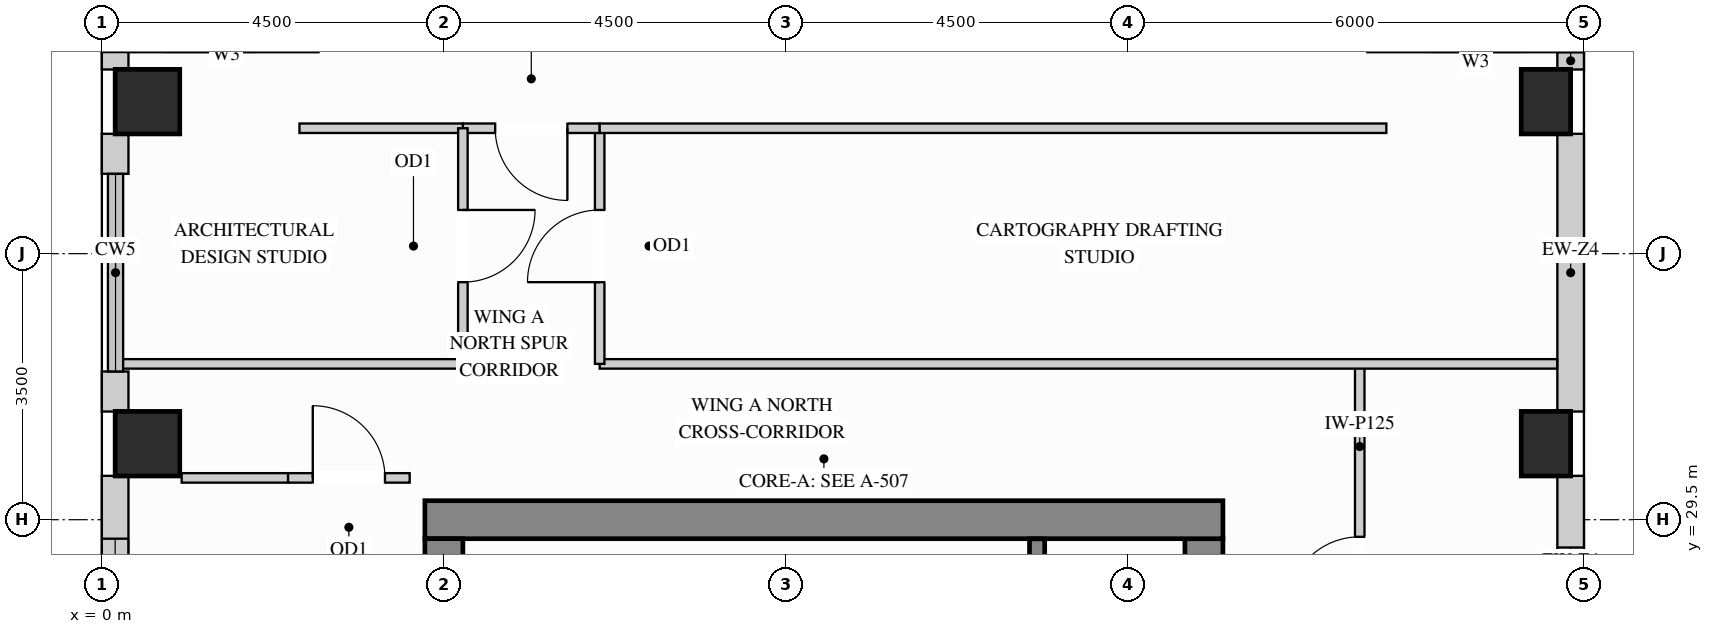
"""IFC4 building model, lengths in metres.
Left out: names, types, materials, properties, quantities, classifications, styles, units other than length and angle.
Written with IfcOpenShell. Run it as: python <this file> out.ifc"""

import sys

from ifc_helpers import new_model, si_unit, direction, frame, frame_2d, origin, origin_2d, place, context, subcontext, project, spatial, rectangle, extrude, source, transform, mapped, element, fill, save


model = new_model("IFC4")
c1 = context("Model", 3, precision=1e-05, world=origin(), true_north=direction((0.0, 1.0)))
c2 = subcontext(c1, "Body", "Model", "MODEL_VIEW")
j1 = project(units=[si_unit("LENGTHUNIT", "METRE"), si_unit("PLANEANGLEUNIT", "RADIAN")], contexts=[c1])
p1 = place(None, origin())
s1 = spatial("IfcSite", under=j1, at=p1, CompositionType="ELEMENT")
p2 = place(p1, origin())
s2 = spatial("IfcBuilding", under=s1, at=p2, CompositionType="ELEMENT")
p3 = place(p2, frame((0.0, 0.0, 241.2)))
s3 = spatial("IfcBuildingStorey", under=s2, at=p3, CompositionType="ELEMENT", Elevation=241.2)
m1 = source(origin(), c2, "Body", "SweptSolid", [
    extrude(rectangle(XDim=0.65, YDim=0.85, at=origin_2d()), origin(), (0.0, 0.0, 1.0), 3.4),
])
for number, where, z_axis, x_axis in (
    (1, (19.0, 30.5, 0.0), (0.0, 0.0, 1.0), (1.0, 0.0, 0.0)),
    (2, (19.0, 35.0, 0.0), (0.0, 0.0, 1.0), (1.0, 0.0, 0.0)),
):
    element("IfcColumn", number, at=place(p3, frame(where, z_axis=z_axis, x_axis=x_axis)), inside=s3, PredefinedType="COLUMN", context=c2, shape_type="MappedRepresentation", body=[
        mapped(m1, transform((0.0, 0.0, 0.0), x_axis=(1.0, 0.0, 0.0), y_axis=(0.0, 1.0, 0.0), z_axis=(0.0, 0.0, 1.0))),
    ])
m2 = source(origin(), c2, "Body", "SweptSolid", [
    extrude(rectangle(XDim=0.85, YDim=0.85, at=origin_2d()), origin(), (0.0, 0.0, 1.0), 3.4),
])
for number, where, z_axis, x_axis in (
    (3, (0.6, 30.5, 0.0), (0.0, 0.0, 1.0), (1.0, 0.0, 0.0)),
    (4, (0.6, 35.0, 0.0), (0.0, 0.0, 1.0), (1.0, 0.0, 0.0)),
):
    element("IfcColumn", number, at=place(p3, frame(where, z_axis=z_axis, x_axis=x_axis)), inside=s3, PredefinedType="COLUMN", context=c2, shape_type="MappedRepresentation", body=[
        mapped(m2, transform((0.0, 0.0, 0.0), x_axis=(1.0, 0.0, 0.0), y_axis=(0.0, 1.0, 0.0), z_axis=(0.0, 0.0, 1.0))),
    ])
m3 = source(origin(), c2, "Body", "SweptSolid", [
    extrude(rectangle(XDim=8.37, YDim=0.5, at=frame_2d((4.185, 0.0))), origin(), (0.0, 0.0, 1.0), 3.4),
])
p4 = place(p3, frame((14.5, 20.88, 0.0), z_axis=(0.0, 0.0, 1.0), x_axis=(0.0, 1.0, 0.0)))
e5 = element("IfcWall", 5, at=p4, inside=s3, PredefinedType="SHEAR", context=c2, shape_type="MappedRepresentation", body=[
    mapped(m3, transform((0.0, 0.0, 0.0), x_axis=(1.0, 0.0, 0.0), y_axis=(0.0, 1.0, 0.0), z_axis=(0.0, 0.0, 1.0))),
])
m4 = source(origin(), c2, "Body", "SweptSolid", [
    extrude(rectangle(XDim=10.5, YDim=0.5, at=frame_2d((5.25, 0.0))), origin(), (0.0, 0.0, 1.0), 3.4),
])
p5 = place(p3, frame((4.25, 29.5, 0.0), z_axis=(0.0, 0.0, 1.0), x_axis=(1.0, 0.0, 0.0)))
e6 = element("IfcWall", 6, at=p5, inside=s3, PredefinedType="SHEAR", context=c2, shape_type="MappedRepresentation", body=[
    mapped(m4, transform((0.0, 0.0, 0.0), x_axis=(1.0, 0.0, 0.0), y_axis=(0.0, 1.0, 0.0), z_axis=(0.0, 0.0, 1.0))),
])
m5 = source(origin(), c2, "Body", "SweptSolid", [
    extrude(rectangle(XDim=20.5, YDim=0.5, at=frame_2d((10.25, 0.0))), origin(), (0.0, 0.0, 1.0), 3.4),
])
p6 = place(p3, frame((4.5, 8.75, 0.0), z_axis=(0.0, 0.0, 1.0), x_axis=(0.0, 1.0, 0.0)))
e7 = element("IfcWall", 7, at=p6, inside=s3, PredefinedType="SHEAR", context=c2, shape_type="MappedRepresentation", body=[
    mapped(m5, transform((0.0, 0.0, 0.0), x_axis=(1.0, 0.0, 0.0), y_axis=(0.0, 1.0, 0.0), z_axis=(0.0, 0.0, 1.0))),
])
p7 = place(p3, frame((19.325, 27.223, 0.0), z_axis=(0.0, 0.0, 1.0), x_axis=(0.0, 1.0, 0.0)))
e8 = element("IfcWall", 8, at=p7, inside=s3, PredefinedType="SOLIDWALL", context=c2, shape_type="SweptSolid", body=[
    extrude(rectangle(XDim=2.854, YDim=0.35, at=frame_2d((1.427, 0.0))), origin(), (0.0, 0.0, 1.0), 2.619),
])
p8 = place(p7, frame((0.411, 0.0, 0.78)))
e9 = element("IfcOpeningElement", 9, at=p8, cuts=e8, PredefinedType="OPENING", context=c2, shape_type="SweptSolid", body=[
    extrude(rectangle(XDim=1.5, YDim=1.659, at=frame_2d((0.75, 0.83))), frame((0.0, 0.185, 0.0), z_axis=(0.0, -1.0, 0.0), x_axis=(1.0, 0.0, 0.0)), (0.0, 0.0, 1.0), 0.37),
])
m6 = source(origin(), c2, "Body", "SweptSolid", [
    extrude(rectangle(XDim=3.654, YDim=0.35, at=frame_2d((1.827, 0.0))), origin(), (0.0, 0.0, 1.0), 2.619),
])
p9 = place(p3, frame((19.325, 30.923, 0.0), z_axis=(0.0, 0.0, 1.0), x_axis=(0.0, 1.0, 0.0)))
e10 = element("IfcWall", 10, at=p9, inside=s3, PredefinedType="SOLIDWALL", context=c2, shape_type="MappedRepresentation", body=[
    mapped(m6, transform((0.0, 0.0, 0.0), x_axis=(1.0, 0.0, 0.0), y_axis=(0.0, 1.0, 0.0), z_axis=(0.0, 0.0, 1.0))),
])
m7 = source(origin(), c2, "Body", "SweptSolid", [
    extrude(rectangle(XDim=0.229, YDim=0.35, at=frame_2d((0.115, 0.0))), origin(), (0.0, 0.0, 1.0), 3.385),
])
for number, where, z_axis, x_axis in (
    (11, (19.325, 35.423, 0.0), (0.0, 0.0, 1.0), (0.0, 1.0, 0.0)),
    (12, (0.175, 35.652, 0.0), (0.0, 0.0, 1.0), (0.0, -1.0, 0.0)),
):
    element("IfcWall", number, at=place(p3, frame(where, z_axis=z_axis, x_axis=x_axis)), inside=s3, PredefinedType="SOLIDWALL", context=c2, shape_type="MappedRepresentation", body=[
        mapped(m7, transform((0.0, 0.0, 0.0), x_axis=(1.0, 0.0, 0.0), y_axis=(0.0, 1.0, 0.0), z_axis=(0.0, 0.0, 1.0))),
    ])
m8 = source(origin(), c2, "Body", "SweptSolid", [
    extrude(rectangle(XDim=0.527, YDim=0.35, at=frame_2d((0.263, 0.0))), origin(), (0.0, 0.0, 1.0), 3.385),
])
for number, where, z_axis, x_axis in (
    (13, (0.175, 34.577, 0.0), (0.0, 0.0, 1.0), (0.0, -1.0, 0.0)),
    (14, (0.175, 31.45, 0.0), (0.0, 0.0, 1.0), (0.0, -1.0, 0.0)),
):
    element("IfcWall", number, at=place(p3, frame(where, z_axis=z_axis, x_axis=x_axis)), inside=s3, PredefinedType="SOLIDWALL", context=c2, shape_type="MappedRepresentation", body=[
        mapped(m8, transform((0.0, 0.0, 0.0), x_axis=(1.0, 0.0, 0.0), y_axis=(0.0, 1.0, 0.0), z_axis=(0.0, 0.0, 1.0))),
    ])
p10 = place(p3, frame((0.175, 30.077, 0.0), z_axis=(0.0, 0.0, 1.0), x_axis=(0.0, -1.0, 0.0)))
e15 = element("IfcWall", 15, at=p10, inside=s3, PredefinedType="SOLIDWALL", context=c2, shape_type="SweptSolid", body=[
    extrude(rectangle(XDim=2.854, YDim=0.35, at=frame_2d((1.427, 0.0))), origin(), (0.0, 0.0, 1.0), 3.385),
])
p11 = place(p10, frame((0.827, 0.0, 0.78)))
e16 = element("IfcOpeningElement", 16, at=p11, cuts=e15, PredefinedType="OPENING", context=c2, shape_type="SweptSolid", body=[
    extrude(rectangle(XDim=1.2, YDim=2.25, at=frame_2d((0.6, 1.125))), frame((0.0, 0.185, 0.0), z_axis=(0.0, -1.0, 0.0), x_axis=(1.0, 0.0, 0.0)), (0.0, 0.0, 1.0), 0.37),
])
p12 = place(p3, frame((16.55, 26.05, 0.0), z_axis=(0.0, 0.0, 1.0), x_axis=(0.0, 1.0, 0.0)))
e17 = element("IfcWall", 17, at=p12, inside=s3, PredefinedType="PARTITIONING", context=c2, shape_type="SweptSolid", body=[
    extrude(rectangle(XDim=5.5, YDim=0.125, at=frame_2d((2.75, 0.0))), origin(), (0.0, 0.0, 1.0), 3.385),
])
p13 = place(p12, frame((2.275, 0.0, 0.0)))
e18 = element("IfcOpeningElement", 18, at=p13, cuts=e17, PredefinedType="OPENING", context=c2, shape_type="SweptSolid", body=[
    extrude(rectangle(XDim=0.95, YDim=2.15, at=frame_2d((0.475, 1.075))), frame((0.0, 0.073, 0.0), z_axis=(0.0, -1.0, 0.0), x_axis=(1.0, 0.0, 0.0)), (0.0, 0.0, 1.0), 0.145),
])
m9 = source(origin(), c2, "Body", "SweptSolid", [
    extrude(rectangle(XDim=12.598, YDim=0.125, at=frame_2d((6.299, 0.0))), origin(), (0.0, 0.0, 1.0), 3.385),
])
p14 = place(p3, frame((6.55, 31.55, 0.0), z_axis=(0.0, 0.0, 1.0), x_axis=(1.0, 0.0, 0.0)))
e19 = element("IfcWall", 19, at=p14, inside=s3, PredefinedType="PARTITIONING", context=c2, shape_type="MappedRepresentation", body=[
    mapped(m9, transform((0.0, 0.0, 0.0), x_axis=(1.0, 0.0, 0.0), y_axis=(0.0, 1.0, 0.0), z_axis=(0.0, 0.0, 1.0))),
])
m10 = source(origin(), c2, "Body", "SweptSolid", [
    extrude(rectangle(XDim=4.54, YDim=0.125, at=frame_2d((2.27, 0.0))), origin(), (0.0, 0.0, 1.0), 3.385),
])
p15 = place(p3, frame((0.21, 31.55, 0.0), z_axis=(0.0, 0.0, 1.0), x_axis=(1.0, 0.0, 0.0)))
e20 = element("IfcWall", 20, at=p15, inside=s3, PredefinedType="PARTITIONING", context=c2, shape_type="MappedRepresentation", body=[
    mapped(m10, transform((0.0, 0.0, 0.0), x_axis=(1.0, 0.0, 0.0), y_axis=(0.0, 1.0, 0.0), z_axis=(0.0, 0.0, 1.0))),
])
m11 = source(origin(), c2, "Body", "SweptSolid", [
    extrude(rectangle(XDim=1.4, YDim=0.125, at=frame_2d((0.7, 0.0))), origin(), (0.0, 0.0, 1.0), 3.385),
])
p16 = place(p3, frame((1.05, 30.05, 0.0), z_axis=(0.0, 0.0, 1.0), x_axis=(1.0, 0.0, 0.0)))
e21 = element("IfcWall", 21, at=p16, inside=s3, PredefinedType="PARTITIONING", context=c2, shape_type="MappedRepresentation", body=[
    mapped(m11, transform((0.0, 0.0, 0.0), x_axis=(1.0, 0.0, 0.0), y_axis=(0.0, 1.0, 0.0), z_axis=(0.0, 0.0, 1.0))),
])
p17 = place(p3, frame((2.45, 30.05, 0.0), z_axis=(0.0, 0.0, 1.0), x_axis=(1.0, 0.0, 0.0)))
e22 = element("IfcWall", 22, at=p17, inside=s3, PredefinedType="PARTITIONING", context=c2, shape_type="SweptSolid", body=[
    extrude(rectangle(XDim=1.6, YDim=0.125, at=frame_2d((0.8, 0.0))), origin(), (0.0, 0.0, 1.0), 3.385),
])
p18 = place(p17, frame((0.325, 0.0, 0.0)))
e23 = element("IfcOpeningElement", 23, at=p18, cuts=e22, PredefinedType="OPENING", context=c2, shape_type="SweptSolid", body=[
    extrude(rectangle(XDim=0.95, YDim=2.15, at=frame_2d((0.475, 1.075))), frame((0.0, 0.073, 0.0), z_axis=(0.0, -1.0, 0.0), x_axis=(1.0, 0.0, 0.0)), (0.0, 0.0, 1.0), 0.145),
])
p19 = place(p3, frame((6.55, 31.55, 0.0), z_axis=(0.0, 0.0, 1.0), x_axis=(0.0, 1.0, 0.0)))
e24 = element("IfcWall", 24, at=p19, inside=s3, PredefinedType="PARTITIONING", context=c2, shape_type="SweptSolid", body=[
    extrude(rectangle(XDim=3.1, YDim=0.125, at=frame_2d((1.55, 0.0))), origin(), (0.0, 0.0, 1.0), 3.385),
])
p20 = place(p19, frame((1.075, 0.0, 0.0)))
e25 = element("IfcOpeningElement", 25, at=p20, cuts=e24, PredefinedType="OPENING", context=c2, shape_type="SweptSolid", body=[
    extrude(rectangle(XDim=0.95, YDim=2.15, at=frame_2d((0.475, 1.075))), frame((0.0, 0.073, 0.0), z_axis=(0.0, -1.0, 0.0), x_axis=(1.0, 0.0, 0.0)), (0.0, 0.0, 1.0), 0.145),
])
p21 = place(p3, frame((4.75, 34.65, 0.0), z_axis=(0.0, 0.0, 1.0), x_axis=(1.0, 0.0, 0.0)))
e26 = element("IfcWall", 26, at=p21, inside=s3, PredefinedType="PARTITIONING", context=c2, shape_type="SweptSolid", body=[
    extrude(rectangle(XDim=1.8, YDim=0.125, at=frame_2d((0.9, 0.0))), origin(), (0.0, 0.0, 1.0), 3.385),
])
p22 = place(p21, frame((0.425, 0.0, 0.0)))
e27 = element("IfcOpeningElement", 27, at=p22, cuts=e26, PredefinedType="OPENING", context=c2, shape_type="SweptSolid", body=[
    extrude(rectangle(XDim=0.95, YDim=2.15, at=frame_2d((0.475, 1.075))), frame((0.0, 0.073, 0.0), z_axis=(0.0, -1.0, 0.0), x_axis=(1.0, 0.0, 0.0)), (0.0, 0.0, 1.0), 0.145),
])
m12 = source(origin(), c2, "Body", "SweptSolid", [
    extrude(rectangle(XDim=10.35, YDim=0.125, at=frame_2d((5.175, 0.0))), origin(), (0.0, 0.0, 1.0), 3.385),
])
p23 = place(p3, frame((6.55, 34.65, 0.0), z_axis=(0.0, 0.0, 1.0), x_axis=(1.0, 0.0, 0.0)))
e28 = element("IfcWall", 28, at=p23, inside=s3, PredefinedType="PARTITIONING", context=c2, shape_type="MappedRepresentation", body=[
    mapped(m12, transform((0.0, 0.0, 0.0), x_axis=(1.0, 0.0, 0.0), y_axis=(0.0, 1.0, 0.0), z_axis=(0.0, 0.0, 1.0))),
])
m13 = source(origin(), c2, "Body", "SweptSolid", [
    extrude(rectangle(XDim=2.15, YDim=0.125, at=frame_2d((1.075, 0.0))), origin(), (0.0, 0.0, 1.0), 3.385),
])
p24 = place(p3, frame((2.6, 34.65, 0.0), z_axis=(0.0, 0.0, 1.0), x_axis=(1.0, 0.0, 0.0)))
e29 = element("IfcWall", 29, at=p24, inside=s3, PredefinedType="PARTITIONING", context=c2, shape_type="MappedRepresentation", body=[
    mapped(m13, transform((0.0, 0.0, 0.0), x_axis=(1.0, 0.0, 0.0), y_axis=(0.0, 1.0, 0.0), z_axis=(0.0, 0.0, 1.0))),
])
p25 = place(p3, frame((4.75, 31.55, 0.0), z_axis=(0.0, 0.0, 1.0), x_axis=(0.0, 1.0, 0.0)))
e30 = element("IfcWall", 30, at=p25, inside=s3, PredefinedType="PARTITIONING", context=c2, shape_type="SweptSolid", body=[
    extrude(rectangle(XDim=3.1, YDim=0.125, at=frame_2d((1.55, 0.0))), origin(), (0.0, 0.0, 1.0), 3.385),
])
p26 = place(p25, frame((1.075, 0.0, 0.0)))
e31 = element("IfcOpeningElement", 31, at=p26, cuts=e30, PredefinedType="OPENING", context=c2, shape_type="SweptSolid", body=[
    extrude(rectangle(XDim=0.95, YDim=2.15, at=frame_2d((0.475, 1.075))), frame((0.0, 0.073, 0.0), z_axis=(0.0, -1.0, 0.0), x_axis=(1.0, 0.0, 0.0)), (0.0, 0.0, 1.0), 0.145),
])
m14 = source(origin(), c2, "Body", "SweptSolid", [
    extrude(rectangle(XDim=3.803, YDim=0.2, at=frame_2d((1.901, 0.0))), origin(), (0.0, 0.0, 1.0), 3.4),
])
p27 = place(p3, frame((12.305, 25.445, 0.0), z_axis=(0.0, 0.0, 1.0), x_axis=(0.0, 1.0, 0.0)))
e32 = element("IfcWall", 32, at=p27, inside=s3, PredefinedType="SHEAR", context=c2, shape_type="MappedRepresentation", body=[
    mapped(m14, transform((0.0, 0.0, 0.0), x_axis=(1.0, 0.0, 0.0), y_axis=(0.0, 1.0, 0.0), z_axis=(0.0, 0.0, 1.0))),
])
m15 = source(origin(), c2, "Body", "SweptSolid", [
    extrude(rectangle(XDim=0.95, YDim=2.15, at=frame_2d((0.475, 1.075))), frame((0.0, 0.025, 0.0), z_axis=(0.0, -1.0, 0.0), x_axis=(1.0, 0.0, 0.0)), (0.0, 0.0, 1.0), 0.05),
])
p28 = place(p13, origin())
e33 = element("IfcDoor", 33, at=p28, inside=s3, OperationType="SINGLE_SWING_LEFT", PredefinedType="DOOR", context=c2, shape_type="MappedRepresentation", body=[
    mapped(m15, transform((0.0, 0.0, 0.0), x_axis=(1.0, 0.0, 0.0), y_axis=(0.0, 1.0, 0.0), z_axis=(0.0, 0.0, 1.0))),
])
fill(e18, e33)
p29 = place(p20, origin())
e34 = element("IfcDoor", 34, at=p29, inside=s3, OperationType="SINGLE_SWING_LEFT", PredefinedType="DOOR", context=c2, shape_type="MappedRepresentation", body=[
    mapped(m15, transform((0.0, 0.0, 0.0), x_axis=(1.0, 0.0, 0.0), y_axis=(0.0, 1.0, 0.0), z_axis=(0.0, 0.0, 1.0))),
])
fill(e25, e34)
p30 = place(p22, origin())
e35 = element("IfcDoor", 35, at=p30, inside=s3, OperationType="SINGLE_SWING_RIGHT", PredefinedType="DOOR", context=c2, shape_type="MappedRepresentation", body=[
    mapped(m15, transform((0.0, 0.0, 0.0), x_axis=(1.0, 0.0, 0.0), y_axis=(0.0, 1.0, 0.0), z_axis=(0.0, 0.0, 1.0))),
])
fill(e27, e35)
p31 = place(p26, origin())
e36 = element("IfcDoor", 36, at=p31, inside=s3, OperationType="SINGLE_SWING_RIGHT", PredefinedType="DOOR", context=c2, shape_type="MappedRepresentation", body=[
    mapped(m15, transform((0.0, 0.0, 0.0), x_axis=(1.0, 0.0, 0.0), y_axis=(0.0, 1.0, 0.0), z_axis=(0.0, 0.0, 1.0))),
])
fill(e31, e36)
p32 = place(p18, origin())
e37 = element("IfcDoor", 37, at=p32, inside=s3, OperationType="SINGLE_SWING_LEFT", PredefinedType="DOOR", context=c2, shape_type="MappedRepresentation", body=[
    mapped(m15, transform((0.0, 0.0, 0.0), x_axis=(1.0, 0.0, 0.0), y_axis=(0.0, 1.0, 0.0), z_axis=(0.0, 0.0, 1.0))),
])
fill(e23, e37)
m16 = source(origin(), c2, "Body", "SweptSolid", [
    extrude(rectangle(XDim=1.2, YDim=2.25, at=frame_2d((0.6, 1.125))), frame((0.0, 0.03, 0.0), z_axis=(0.0, -1.0, 0.0), x_axis=(1.0, 0.0, 0.0)), (0.0, 0.0, 1.0), 0.06),
])
p33 = place(p11, origin())
e38 = element("IfcWindow", 38, at=p33, inside=s3, PartitioningType="SINGLE_PANEL", PredefinedType="WINDOW", context=c2, shape_type="MappedRepresentation", body=[
    mapped(m16, transform((0.0, 0.0, 0.0), x_axis=(1.0, 0.0, 0.0), y_axis=(0.0, 1.0, 0.0), z_axis=(0.0, 0.0, 1.0))),
])
fill(e16, e38)
m17 = source(origin(), c2, "Body", "SweptSolid", [
    extrude(rectangle(XDim=1.5, YDim=1.659, at=frame_2d((0.75, 0.83))), frame((0.0, 0.03, 0.0), z_axis=(0.0, -1.0, 0.0), x_axis=(1.0, 0.0, 0.0)), (0.0, 0.0, 1.0), 0.06),
])
p34 = place(p8, origin())
e39 = element("IfcWindow", 39, at=p34, inside=s3, PartitioningType="SINGLE_PANEL", PredefinedType="WINDOW", context=c2, shape_type="MappedRepresentation", body=[
    mapped(m17, transform((0.0, 0.0, 0.0), x_axis=(1.0, 0.0, 0.0), y_axis=(0.0, 1.0, 0.0), z_axis=(0.0, 0.0, 1.0))),
])
fill(e9, e39)
save(model, sys.argv[1])
